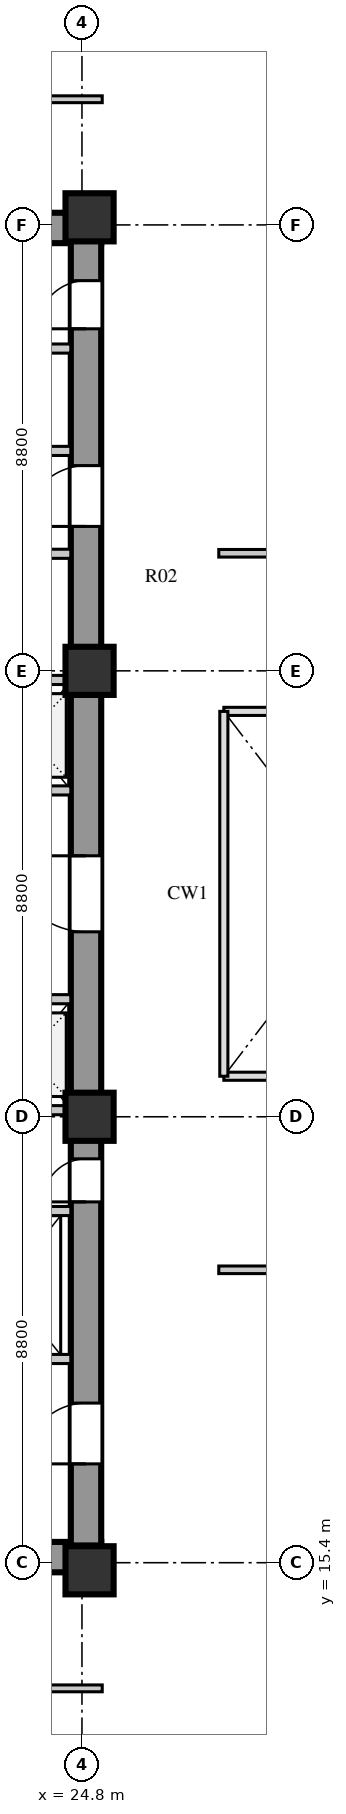
"""IFC4 building model, lengths in metres.
Left out: names, types, materials, properties, quantities, classifications, styles, units other than length and angle.
Written with IfcOpenShell. Run it as: python <this file> out.ifc"""

import sys

from ifc_helpers import new_model, si_unit, direction, frame, frame_2d, origin, origin_2d, place, context, subcontext, project, spatial, rectangle, extrude, element, fill, save


model = new_model("IFC4")
c1 = context("Model", 3, precision=1e-05, world=origin(), true_north=direction((0.0, 1.0)))
c2 = subcontext(c1, "Body", "Model", "MODEL_VIEW")
j1 = project(units=[si_unit("LENGTHUNIT", "METRE"), si_unit("PLANEANGLEUNIT", "RADIAN")], contexts=[c1])
p1 = place(None, origin())
s1 = spatial("IfcSite", under=j1, at=p1, CompositionType="ELEMENT")
p2 = place(p1, origin())
s2 = spatial("IfcBuilding", under=s1, at=p2, CompositionType="ELEMENT")
p3 = place(p2, frame((0.0, 0.0, 8.0)))
s3 = spatial("IfcBuildingStorey", under=s2, at=p3, CompositionType="ELEMENT", Elevation=8.0)
for number, where, z_axis, x_axis in (
    (1, (15.3, 15.51, 0.0), (0.0, 0.0, 1.0), (1.0, 0.0, 0.0)),
    (2, (15.3, 41.74, 0.0), (0.0, 0.0, 1.0), (1.0, 0.0, 0.0)),
):
    element("IfcWall", number, at=place(p3, frame(where, z_axis=z_axis, x_axis=x_axis)), inside=s3, PredefinedType="SHEAR", context=c2, shape_type="SweptSolid", body=[
        extrude(rectangle(XDim=9.88, YDim=0.6, at=frame_2d((4.94, 0.0))), origin(), (0.0, 0.0, 1.0), 4.22),
    ])
p4 = place(p3, frame((24.88, 15.74, 0.0), z_axis=(0.0, 0.0, 1.0), x_axis=(0.0, 1.0, 0.0)))
e3 = element("IfcWall", 3, at=p4, inside=s3, PredefinedType="SHEAR", context=c2, shape_type="SweptSolid", body=[
    extrude(rectangle(XDim=25.76, YDim=0.6, at=frame_2d((12.88, 0.0))), origin(), (0.0, 0.0, 1.0), 4.22),
])
p5 = place(p4, frame((1.61, 0.0, 0.0)))
e4 = element("IfcOpeningElement", 4, at=p5, cuts=e3, PredefinedType="OPENING", context=c2, shape_type="SweptSolid", body=[
    extrude(rectangle(XDim=1.2, YDim=2.1, at=frame_2d((0.6, 1.05))), frame((0.0, 0.31, 0.0), z_axis=(0.0, -1.0, 0.0), x_axis=(1.0, 0.0, 0.0)), (0.0, 0.0, 1.0), 0.62),
])
p6 = place(p4, frame((6.78, 0.0, 0.0)))
e5 = element("IfcOpeningElement", 5, at=p6, cuts=e3, PredefinedType="OPENING", context=c2, shape_type="SweptSolid", body=[
    extrude(rectangle(XDim=0.85, YDim=2.06, at=frame_2d((0.425, 1.03))), frame((0.0, 0.31, 0.0), z_axis=(0.0, -1.0, 0.0), x_axis=(1.0, 0.0, 0.0)), (0.0, 0.0, 1.0), 0.62),
])
p7 = place(p4, frame((12.11, 0.0, 0.0)))
e6 = element("IfcOpeningElement", 6, at=p7, cuts=e3, PredefinedType="OPENING", context=c2, shape_type="SweptSolid", body=[
    extrude(rectangle(XDim=1.5, YDim=2.12, at=frame_2d((0.75, 1.06))), frame((0.0, 0.31, 0.0), z_axis=(0.0, -1.0, 0.0), x_axis=(1.0, 0.0, 0.0)), (0.0, 0.0, 1.0), 0.62),
])
p8 = place(p4, frame((20.11, 0.0, 0.0)))
e7 = element("IfcOpeningElement", 7, at=p8, cuts=e3, PredefinedType="OPENING", context=c2, shape_type="SweptSolid", body=[
    extrude(rectangle(XDim=1.2, YDim=2.12, at=frame_2d((0.6, 1.06))), frame((0.0, 0.31, 0.0), z_axis=(0.0, -1.0, 0.0), x_axis=(1.0, 0.0, 0.0)), (0.0, 0.0, 1.0), 0.62),
])
p9 = place(p4, frame((24.01, 0.0, 0.0)))
e8 = element("IfcOpeningElement", 8, at=p9, cuts=e3, PredefinedType="OPENING", context=c2, shape_type="SweptSolid", body=[
    extrude(rectangle(XDim=0.95, YDim=2.1, at=frame_2d((0.475, 1.05))), frame((0.0, 0.31, 0.0), z_axis=(0.0, -1.0, 0.0), x_axis=(1.0, 0.0, 0.0)), (0.0, 0.0, 1.0), 0.62),
])
for number, where, z_axis, x_axis in (
    (9, (24.95, 15.25, 0.0), (0.0, 0.0, 1.0), (1.0, 0.0, 0.0)),
    (10, (24.95, 24.2, 0.0), (0.0, 0.0, 1.0), (1.0, 0.0, 0.0)),
    (11, (24.95, 33.0, 0.0), (0.0, 0.0, 1.0), (1.0, 0.0, 0.0)),
    (12, (24.95, 41.95, 0.0), (0.0, 0.0, 1.0), (1.0, 0.0, 0.0)),
):
    element("IfcColumn", number, at=place(p3, frame(where, z_axis=z_axis, x_axis=x_axis)), inside=s3, PredefinedType="COLUMN", context=c2, shape_type="SweptSolid", body=[
        extrude(rectangle(XDim=0.95, YDim=0.95, at=origin_2d()), origin(), (0.0, 0.0, 1.0), 4.22),
    ])
p10 = place(p3, frame((19.64, 19.42, 0.0), z_axis=(0.0, 0.0, 1.0), x_axis=(1.0, 0.0, 0.0)))
e13 = element("IfcWall", 13, at=p10, inside=s3, PredefinedType="SOLIDWALL", context=c2, shape_type="SweptSolid", body=[
    extrude(rectangle(XDim=4.94, YDim=0.18, at=frame_2d((2.47, 0.0))), origin(), (0.0, 0.0, 1.0), 4.22),
])
p11 = place(p10, frame((0.72, 0.0, 0.0)))
e14 = element("IfcOpeningElement", 14, at=p11, cuts=e13, PredefinedType="OPENING", context=c2, shape_type="SweptSolid", body=[
    extrude(rectangle(XDim=1.1, YDim=2.1, at=frame_2d((0.55, 1.05))), frame((0.0, 0.1, 0.0), z_axis=(0.0, -1.0, 0.0), x_axis=(1.0, 0.0, 0.0)), (0.0, 0.0, 1.0), 0.2),
])
p12 = place(p10, frame((3.02, 0.0, 0.0)))
e15 = element("IfcOpeningElement", 15, at=p12, cuts=e13, PredefinedType="OPENING", context=c2, shape_type="SweptSolid", body=[
    extrude(rectangle(XDim=1.1, YDim=2.1, at=frame_2d((0.55, 1.05))), frame((0.0, 0.1, 0.0), z_axis=(0.0, -1.0, 0.0), x_axis=(1.0, 0.0, 0.0)), (0.0, 0.0, 1.0), 0.2),
])
p13 = place(p3, frame((19.64, 22.34, 0.0), z_axis=(0.0, 0.0, 1.0), x_axis=(1.0, 0.0, 0.0)))
e16 = element("IfcWall", 16, at=p13, inside=s3, PredefinedType="SOLIDWALL", context=c2, shape_type="SweptSolid", body=[
    extrude(rectangle(XDim=4.94, YDim=0.18, at=frame_2d((2.47, 0.0))), origin(), (0.0, 0.0, 1.0), 4.22),
])
p14 = place(p3, frame((15.9, 26.52, 0.0), z_axis=(0.0, 0.0, 1.0), x_axis=(1.0, 0.0, 0.0)))
e17 = element("IfcWall", 17, at=p14, inside=s3, PredefinedType="SOLIDWALL", context=c2, shape_type="SweptSolid", body=[
    extrude(rectangle(XDim=8.68, YDim=0.18, at=frame_2d((4.34, 0.0))), origin(), (0.0, 0.0, 1.0), 4.22),
])
p15 = place(p14, frame((1.76, 0.0, 0.0)))
e18 = element("IfcOpeningElement", 18, at=p15, cuts=e17, PredefinedType="OPENING", context=c2, shape_type="SweptSolid", body=[
    extrude(rectangle(XDim=1.0, YDim=2.1, at=frame_2d((0.5, 1.05))), frame((0.0, 0.1, 0.0), z_axis=(0.0, -1.0, 0.0), x_axis=(1.0, 0.0, 0.0)), (0.0, 0.0, 1.0), 0.2),
])
p16 = place(p14, frame((3.6, 0.0, 0.0)))
e19 = element("IfcOpeningElement", 19, at=p16, cuts=e17, PredefinedType="OPENING", context=c2, shape_type="SweptSolid", body=[
    extrude(rectangle(XDim=1.0, YDim=2.1, at=frame_2d((0.5, 1.05))), frame((0.0, 0.1, 0.0), z_axis=(0.0, -1.0, 0.0), x_axis=(1.0, 0.0, 0.0)), (0.0, 0.0, 1.0), 0.2),
])
p17 = place(p14, frame((5.44, 0.0, 0.0)))
e20 = element("IfcOpeningElement", 20, at=p17, cuts=e17, PredefinedType="OPENING", context=c2, shape_type="SweptSolid", body=[
    extrude(rectangle(XDim=1.0, YDim=2.1, at=frame_2d((0.5, 1.05))), frame((0.0, 0.1, 0.0), z_axis=(0.0, -1.0, 0.0), x_axis=(1.0, 0.0, 0.0)), (0.0, 0.0, 1.0), 0.2),
])
p18 = place(p14, frame((7.28, 0.0, 0.0)))
e21 = element("IfcOpeningElement", 21, at=p18, cuts=e17, PredefinedType="OPENING", context=c2, shape_type="SweptSolid", body=[
    extrude(rectangle(XDim=1.0, YDim=2.1, at=frame_2d((0.5, 1.05))), frame((0.0, 0.1, 0.0), z_axis=(0.0, -1.0, 0.0), x_axis=(1.0, 0.0, 0.0)), (0.0, 0.0, 1.0), 0.2),
])
p19 = place(p3, frame((15.9, 24.33, 0.0), z_axis=(0.0, 0.0, 1.0), x_axis=(1.0, 0.0, 0.0)))
e22 = element("IfcWall", 22, at=p19, inside=s3, PredefinedType="SOLIDWALL", context=c2, shape_type="SweptSolid", body=[
    extrude(rectangle(XDim=8.68, YDim=0.18, at=frame_2d((4.34, 0.0))), origin(), (0.0, 0.0, 1.0), 3.42),
])
p20 = place(p3, frame((15.9, 30.64, 0.0), z_axis=(0.0, 0.0, 1.0), x_axis=(1.0, 0.0, 0.0)))
e23 = element("IfcWall", 23, at=p20, inside=s3, PredefinedType="SOLIDWALL", context=c2, shape_type="SweptSolid", body=[
    extrude(rectangle(XDim=8.68, YDim=0.18, at=frame_2d((4.34, 0.0))), origin(), (0.0, 0.0, 1.0), 4.22),
])
p21 = place(p20, frame((1.76, 0.0, 0.0)))
e24 = element("IfcOpeningElement", 24, at=p21, cuts=e23, PredefinedType="OPENING", context=c2, shape_type="SweptSolid", body=[
    extrude(rectangle(XDim=1.0, YDim=2.1, at=frame_2d((0.5, 1.05))), frame((0.0, 0.1, 0.0), z_axis=(0.0, -1.0, 0.0), x_axis=(1.0, 0.0, 0.0)), (0.0, 0.0, 1.0), 0.2),
])
p22 = place(p20, frame((3.6, 0.0, 0.0)))
e25 = element("IfcOpeningElement", 25, at=p22, cuts=e23, PredefinedType="OPENING", context=c2, shape_type="SweptSolid", body=[
    extrude(rectangle(XDim=1.0, YDim=2.1, at=frame_2d((0.5, 1.05))), frame((0.0, 0.1, 0.0), z_axis=(0.0, -1.0, 0.0), x_axis=(1.0, 0.0, 0.0)), (0.0, 0.0, 1.0), 0.2),
])
p23 = place(p20, frame((5.44, 0.0, 0.0)))
e26 = element("IfcOpeningElement", 26, at=p23, cuts=e23, PredefinedType="OPENING", context=c2, shape_type="SweptSolid", body=[
    extrude(rectangle(XDim=1.0, YDim=2.1, at=frame_2d((0.5, 1.05))), frame((0.0, 0.1, 0.0), z_axis=(0.0, -1.0, 0.0), x_axis=(1.0, 0.0, 0.0)), (0.0, 0.0, 1.0), 0.2),
])
p24 = place(p20, frame((7.28, 0.0, 0.0)))
e27 = element("IfcOpeningElement", 27, at=p24, cuts=e23, PredefinedType="OPENING", context=c2, shape_type="SweptSolid", body=[
    extrude(rectangle(XDim=1.0, YDim=2.1, at=frame_2d((0.5, 1.05))), frame((0.0, 0.1, 0.0), z_axis=(0.0, -1.0, 0.0), x_axis=(1.0, 0.0, 0.0)), (0.0, 0.0, 1.0), 0.2),
])
p25 = place(p3, frame((15.9, 32.82, 0.0), z_axis=(0.0, 0.0, 1.0), x_axis=(1.0, 0.0, 0.0)))
e28 = element("IfcWall", 28, at=p25, inside=s3, PredefinedType="SOLIDWALL", context=c2, shape_type="SweptSolid", body=[
    extrude(rectangle(XDim=8.68, YDim=0.18, at=frame_2d((4.34, 0.0))), origin(), (0.0, 0.0, 1.0), 3.42),
])
p26 = place(p3, frame((22.02, 35.31, 0.0), z_axis=(0.0, 0.0, 1.0), x_axis=(1.0, 0.0, 0.0)))
e29 = element("IfcWall", 29, at=p26, inside=s3, PredefinedType="SOLIDWALL", context=c2, shape_type="SweptSolid", body=[
    extrude(rectangle(XDim=2.56, YDim=0.18, at=frame_2d((1.28, 0.0))), origin(), (0.0, 0.0, 1.0), 4.22),
])
p27 = place(p26, frame((0.55, 0.0, 0.0)))
e30 = element("IfcOpeningElement", 30, at=p27, cuts=e29, PredefinedType="OPENING", context=c2, shape_type="SweptSolid", body=[
    extrude(rectangle(XDim=1.0, YDim=2.1, at=frame_2d((0.5, 1.05))), frame((0.0, 0.1, 0.0), z_axis=(0.0, -1.0, 0.0), x_axis=(1.0, 0.0, 0.0)), (0.0, 0.0, 1.0), 0.2),
])
p28 = place(p3, frame((19.64, 37.34, 0.0), z_axis=(0.0, 0.0, 1.0), x_axis=(1.0, 0.0, 0.0)))
e31 = element("IfcWall", 31, at=p28, inside=s3, PredefinedType="SOLIDWALL", context=c2, shape_type="SweptSolid", body=[
    extrude(rectangle(XDim=4.94, YDim=0.18, at=frame_2d((2.47, 0.0))), origin(), (0.0, 0.0, 1.0), 4.22),
])
p29 = place(p28, frame((0.45, 0.0, 0.0)))
e32 = element("IfcOpeningElement", 32, at=p29, cuts=e31, PredefinedType="OPENING", context=c2, shape_type="SweptSolid", body=[
    extrude(rectangle(XDim=1.0, YDim=2.1, at=frame_2d((0.5, 1.05))), frame((0.0, 0.1, 0.0), z_axis=(0.0, -1.0, 0.0), x_axis=(1.0, 0.0, 0.0)), (0.0, 0.0, 1.0), 0.2),
])
p30 = place(p28, frame((2.5, 0.0, 0.0)))
e33 = element("IfcOpeningElement", 33, at=p30, cuts=e31, PredefinedType="OPENING", context=c2, shape_type="SweptSolid", body=[
    extrude(rectangle(XDim=1.0, YDim=2.1, at=frame_2d((0.5, 1.05))), frame((0.0, 0.1, 0.0), z_axis=(0.0, -1.0, 0.0), x_axis=(1.0, 0.0, 0.0)), (0.0, 0.0, 1.0), 0.2),
])
p31 = place(p3, frame((19.64, 39.36, 0.0), z_axis=(0.0, 0.0, 1.0), x_axis=(1.0, 0.0, 0.0)))
e34 = element("IfcWall", 34, at=p31, inside=s3, PredefinedType="SOLIDWALL", context=c2, shape_type="SweptSolid", body=[
    extrude(rectangle(XDim=4.94, YDim=0.18, at=frame_2d((2.47, 0.0))), origin(), (0.0, 0.0, 1.0), 4.22),
])
p32 = place(p3, frame((15.2, 12.92, 0.0), z_axis=(0.0, 0.0, 1.0), x_axis=(1.0, 0.0, 0.0)))
e35 = element("IfcWall", 35, at=p32, inside=s3, PredefinedType="PARTITIONING", context=c2, shape_type="SweptSolid", body=[
    extrude(rectangle(XDim=10.0, YDim=0.135, at=frame_2d((5.0, 0.0))), origin(), (0.0, 0.0, 1.0), 4.22),
])
p33 = place(p32, frame((3.6, 0.0, 0.0)))
e36 = element("IfcOpeningElement", 36, at=p33, cuts=e35, PredefinedType="OPENING", context=c2, shape_type="SweptSolid", body=[
    extrude(rectangle(XDim=1.05, YDim=2.1, at=frame_2d((0.525, 1.05))), frame((0.0, 0.078, 0.0), z_axis=(0.0, -1.0, 0.0), x_axis=(1.0, 0.0, 0.0)), (0.0, 0.0, 1.0), 0.155),
])
p34 = place(p3, frame((15.2, 44.28, 0.0), z_axis=(0.0, 0.0, 1.0), x_axis=(1.0, 0.0, 0.0)))
e37 = element("IfcWall", 37, at=p34, inside=s3, PredefinedType="PARTITIONING", context=c2, shape_type="SweptSolid", body=[
    extrude(rectangle(XDim=10.0, YDim=0.135, at=frame_2d((5.0, 0.0))), origin(), (0.0, 0.0, 1.0), 4.22),
])
p35 = place(p34, frame((3.6, 0.0, 0.0)))
e38 = element("IfcOpeningElement", 38, at=p35, cuts=e37, PredefinedType="OPENING", context=c2, shape_type="SweptSolid", body=[
    extrude(rectangle(XDim=1.05, YDim=2.1, at=frame_2d((0.525, 1.05))), frame((0.0, 0.078, 0.0), z_axis=(0.0, -1.0, 0.0), x_axis=(1.0, 0.0, 0.0)), (0.0, 0.0, 1.0), 0.155),
])
p36 = place(p3, frame((27.5, 21.18, 0.0), z_axis=(0.0, 0.0, 1.0), x_axis=(1.0, 0.0, 0.0)))
e39 = element("IfcWall", 39, at=p36, inside=s3, PredefinedType="PARTITIONING", context=c2, shape_type="SweptSolid", body=[
    extrude(rectangle(XDim=7.45, YDim=0.15, at=frame_2d((3.725, 0.0))), origin(), (0.0, 0.0, 1.0), 3.82),
])
p37 = place(p36, frame((2.4, 0.0, 0.0)))
e40 = element("IfcOpeningElement", 40, at=p37, cuts=e39, PredefinedType="OPENING", context=c2, shape_type="SweptSolid", body=[
    extrude(rectangle(XDim=1.2, YDim=2.1, at=frame_2d((0.6, 1.05))), frame((0.0, 0.085, 0.0), z_axis=(0.0, -1.0, 0.0), x_axis=(1.0, 0.0, 0.0)), (0.0, 0.0, 1.0), 0.17),
])
p38 = place(p3, frame((27.5, 35.32, 0.0), z_axis=(0.0, 0.0, 1.0), x_axis=(1.0, 0.0, 0.0)))
e41 = element("IfcWall", 41, at=p38, inside=s3, PredefinedType="PARTITIONING", context=c2, shape_type="SweptSolid", body=[
    extrude(rectangle(XDim=7.22, YDim=0.15, at=frame_2d((3.61, 0.0))), origin(), (0.0, 0.0, 1.0), 4.22),
])
p39 = place(p38, frame((2.4, 0.0, 0.0)))
e42 = element("IfcOpeningElement", 42, at=p39, cuts=e41, PredefinedType="OPENING", context=c2, shape_type="SweptSolid", body=[
    extrude(rectangle(XDim=1.2, YDim=2.1, at=frame_2d((0.6, 1.05))), frame((0.0, 0.085, 0.0), z_axis=(0.0, -1.0, 0.0), x_axis=(1.0, 0.0, 0.0)), (0.0, 0.0, 1.0), 0.17),
])
p40 = place(p5, frame((1.2, 0.0, 0.0), z_axis=(0.0, 0.0, 1.0), x_axis=(-1.0, 0.0, 0.0)))
e43 = element("IfcDoor", 43, at=p40, inside=s3, OperationType="SINGLE_SWING_RIGHT", PredefinedType="DOOR", context=c2, shape_type="SweptSolid", body=[
    extrude(rectangle(XDim=1.2, YDim=2.1, at=frame_2d((0.6, 1.05))), frame((0.0, 0.025, 0.0), z_axis=(0.0, -1.0, 0.0), x_axis=(1.0, 0.0, 0.0)), (0.0, 0.0, 1.0), 0.05),
])
fill(e4, e43)
p41 = place(p6, frame((0.85, 0.0, 0.0), z_axis=(0.0, 0.0, 1.0), x_axis=(-1.0, 0.0, 0.0)))
e44 = element("IfcDoor", 44, at=p41, inside=s3, OperationType="SINGLE_SWING_RIGHT", PredefinedType="DOOR", context=c2, shape_type="SweptSolid", body=[
    extrude(rectangle(XDim=0.85, YDim=2.06, at=frame_2d((0.425, 1.03))), frame((0.0, 0.025, 0.0), z_axis=(0.0, -1.0, 0.0), x_axis=(1.0, 0.0, 0.0)), (0.0, 0.0, 1.0), 0.05),
])
fill(e5, e44)
p42 = place(p7, frame((1.5, 0.0, 0.0), z_axis=(0.0, 0.0, 1.0), x_axis=(-1.0, 0.0, 0.0)))
e45 = element("IfcDoor", 45, at=p42, inside=s3, OperationType="SINGLE_SWING_LEFT", PredefinedType="DOOR", context=c2, shape_type="SweptSolid", body=[
    extrude(rectangle(XDim=1.5, YDim=2.12, at=frame_2d((0.75, 1.06))), frame((0.0, 0.025, 0.0), z_axis=(0.0, -1.0, 0.0), x_axis=(1.0, 0.0, 0.0)), (0.0, 0.0, 1.0), 0.05),
])
fill(e6, e45)
p43 = place(p8, frame((1.2, 0.0, 0.0), z_axis=(0.0, 0.0, 1.0), x_axis=(-1.0, 0.0, 0.0)))
e46 = element("IfcDoor", 46, at=p43, inside=s3, OperationType="SINGLE_SWING_RIGHT", PredefinedType="DOOR", context=c2, shape_type="SweptSolid", body=[
    extrude(rectangle(XDim=1.2, YDim=2.12, at=frame_2d((0.6, 1.06))), frame((0.0, 0.025, 0.0), z_axis=(0.0, -1.0, 0.0), x_axis=(1.0, 0.0, 0.0)), (0.0, 0.0, 1.0), 0.05),
])
fill(e7, e46)
p44 = place(p9, frame((0.95, 0.0, 0.0), z_axis=(0.0, 0.0, 1.0), x_axis=(-1.0, 0.0, 0.0)))
e47 = element("IfcDoor", 47, at=p44, inside=s3, OperationType="SINGLE_SWING_RIGHT", PredefinedType="DOOR", context=c2, shape_type="SweptSolid", body=[
    extrude(rectangle(XDim=0.95, YDim=2.1, at=frame_2d((0.475, 1.05))), frame((0.0, 0.025, 0.0), z_axis=(0.0, -1.0, 0.0), x_axis=(1.0, 0.0, 0.0)), (0.0, 0.0, 1.0), 0.05),
])
fill(e8, e47)
save(model, sys.argv[1])
